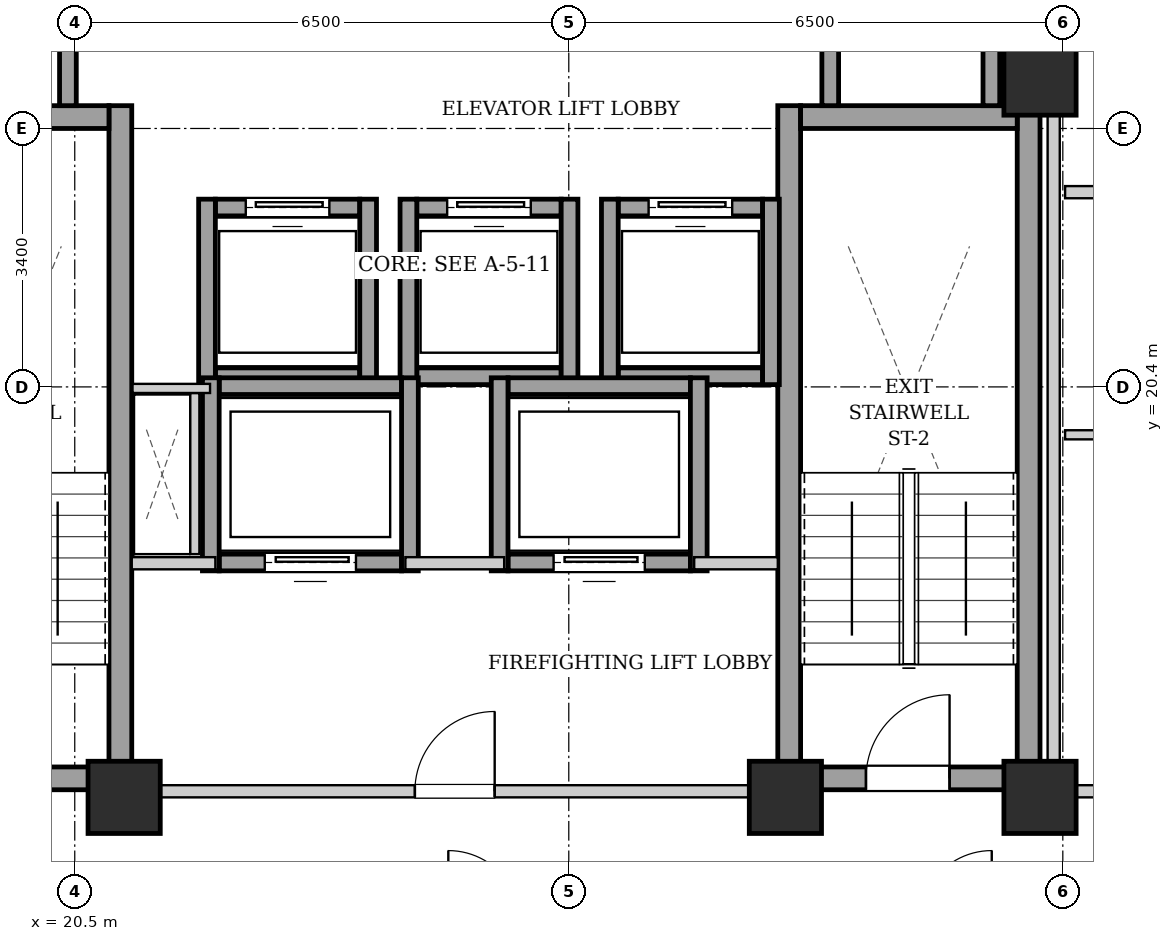
"""IFC4 building model, lengths in metres.
Left out: names, types, materials, properties, quantities, classifications, styles, units other than length and angle.
Written with IfcOpenShell. Run it as: python <this file> out.ifc"""

import sys

from ifc_helpers import new_model, si_unit, direction, frame, frame_2d, origin, origin_2d, place, context, subcontext, project, spatial, rectangle, extrude, element, fill, save


model = new_model("IFC4")
c1 = context("Model", 3, precision=1e-05, world=origin(), true_north=direction((0.0, 1.0)))
c2 = subcontext(c1, "Body", "Model", "MODEL_VIEW")
j1 = project(units=[si_unit("LENGTHUNIT", "METRE"), si_unit("PLANEANGLEUNIT", "RADIAN")], contexts=[c1])
p1 = place(None, origin())
s1 = spatial("IfcSite", under=j1, at=p1, CompositionType="ELEMENT")
p2 = place(p1, origin())
s2 = spatial("IfcBuilding", under=s1, at=p2, CompositionType="ELEMENT")
p3 = place(p2, frame((0.0, 0.0, 137.4)))
s3 = spatial("IfcBuildingStorey", under=s2, at=p3, CompositionType="ELEMENT", Elevation=137.4)
for number, where, z_axis, x_axis in (
    (1, (21.15, 15.0, 0.0), (0.0, 0.0, 1.0), (1.0, 0.0, 0.0)),
    (2, (29.85, 15.0, 0.0), (0.0, 0.0, 1.0), (1.0, 0.0, 0.0)),
    (3, (33.2, 15.0, 0.0), (0.0, 0.0, 1.0), (1.0, 0.0, 0.0)),
    (4, (33.2, 24.45, 0.0), (0.0, 0.0, 1.0), (1.0, 0.0, 0.0)),
):
    element("IfcColumn", number, at=place(p3, frame(where, z_axis=z_axis, x_axis=x_axis)), inside=s3, PredefinedType="COLUMN", context=c2, shape_type="SweptSolid", body=[
        extrude(rectangle(XDim=0.95, YDim=0.95, at=origin_2d()), origin(), (0.0, 0.0, 1.0), 3.25),
    ])
p4 = place(p3, frame((21.1, 15.1, 0.0), z_axis=(0.0, 0.0, 1.0), x_axis=(0.0, 1.0, 0.0)))
e5 = element("IfcWall", 5, at=p4, inside=s3, PredefinedType="SHEAR", context=c2, shape_type="SweptSolid", body=[
    extrude(rectangle(XDim=9.0, YDim=0.3, at=frame_2d((4.5, 0.0))), origin(), (0.0, 0.0, 1.0), 2.99),
])
p5 = place(p3, frame((18.1, 23.95, 0.0), z_axis=(0.0, 0.0, 1.0), x_axis=(1.0, 0.0, 0.0)))
e6 = element("IfcWall", 6, at=p5, inside=s3, PredefinedType="SHEAR", context=c2, shape_type="SweptSolid", body=[
    extrude(rectangle(XDim=2.85, YDim=0.3, at=frame_2d((1.425, 0.0))), origin(), (0.0, 0.0, 1.0), 2.99),
])
p6 = place(p3, frame((18.1, 15.25, 0.0), z_axis=(0.0, 0.0, 1.0), x_axis=(1.0, 0.0, 0.0)))
e7 = element("IfcWall", 7, at=p6, inside=s3, PredefinedType="SHEAR", context=c2, shape_type="SweptSolid", body=[
    extrude(rectangle(XDim=2.85, YDim=0.3, at=frame_2d((1.425, 0.0))), origin(), (0.0, 0.0, 1.0), 2.99),
])
p7 = place(p6, frame((0.86, 0.0, 0.0)))
e8 = element("IfcOpeningElement", 8, at=p7, cuts=e7, PredefinedType="OPENING", context=c2, shape_type="SweptSolid", body=[
    extrude(rectangle(XDim=1.1, YDim=2.05, at=frame_2d((0.55, 1.025))), frame((0.0, 0.16, 0.0), z_axis=(0.0, -1.0, 0.0), x_axis=(1.0, 0.0, 0.0)), (0.0, 0.0, 1.0), 0.32),
])
for number, where, z_axis, x_axis in (
    (9, (29.9, 15.1, 0.0), (0.0, 0.0, 1.0), (0.0, 1.0, 0.0)),
    (10, (33.05, 15.1, 0.0), (0.0, 0.0, 1.0), (0.0, 1.0, 0.0)),
):
    element("IfcWall", number, at=place(p3, frame(where, z_axis=z_axis, x_axis=x_axis)), inside=s3, PredefinedType="SHEAR", context=c2, shape_type="SweptSolid", body=[
        extrude(rectangle(XDim=9.0, YDim=0.3, at=frame_2d((4.5, 0.0))), origin(), (0.0, 0.0, 1.0), 2.99),
    ])
p8 = place(p3, frame((30.05, 23.95, 0.0), z_axis=(0.0, 0.0, 1.0), x_axis=(1.0, 0.0, 0.0)))
e11 = element("IfcWall", 11, at=p8, inside=s3, PredefinedType="SHEAR", context=c2, shape_type="SweptSolid", body=[
    extrude(rectangle(XDim=2.85, YDim=0.3, at=frame_2d((1.425, 0.0))), origin(), (0.0, 0.0, 1.0), 2.99),
])
p9 = place(p3, frame((30.05, 15.25, 0.0), z_axis=(0.0, 0.0, 1.0), x_axis=(1.0, 0.0, 0.0)))
e12 = element("IfcWall", 12, at=p9, inside=s3, PredefinedType="SHEAR", context=c2, shape_type="SweptSolid", body=[
    extrude(rectangle(XDim=2.85, YDim=0.3, at=frame_2d((1.425, 0.0))), origin(), (0.0, 0.0, 1.0), 2.99),
])
p10 = place(p9, frame((0.86, 0.0, 0.0)))
e13 = element("IfcOpeningElement", 13, at=p10, cuts=e12, PredefinedType="OPENING", context=c2, shape_type="SweptSolid", body=[
    extrude(rectangle(XDim=1.1, YDim=2.05, at=frame_2d((0.55, 1.025))), frame((0.0, 0.16, 0.0), z_axis=(0.0, -1.0, 0.0), x_axis=(1.0, 0.0, 0.0)), (0.0, 0.0, 1.0), 0.32),
])
p11 = place(p3, frame((22.35, 20.54, 0.0), z_axis=(0.0, 0.0, 1.0), x_axis=(1.0, 0.0, 0.0)))
e14 = element("IfcWall", 14, at=p11, inside=s3, PredefinedType="SHEAR", context=c2, shape_type="SweptSolid", body=[
    extrude(rectangle(XDim=1.9, YDim=0.22, at=frame_2d((0.95, 0.0))), origin(), (0.0, 0.0, 1.0), 2.99),
])
p12 = place(p3, frame((22.35, 22.76, 0.0), z_axis=(0.0, 0.0, 1.0), x_axis=(1.0, 0.0, 0.0)))
e15 = element("IfcWall", 15, at=p12, inside=s3, PredefinedType="SHEAR", context=c2, shape_type="SweptSolid", body=[
    extrude(rectangle(XDim=1.9, YDim=0.22, at=frame_2d((0.95, 0.0))), origin(), (0.0, 0.0, 1.0), 2.99),
])
p13 = place(p12, frame((0.4, 0.0, 0.0)))
e16 = element("IfcOpeningElement", 16, at=p13, cuts=e15, PredefinedType="OPENING", context=c2, shape_type="SweptSolid", body=[
    extrude(rectangle(XDim=1.1, YDim=2.15, at=frame_2d((0.55, 1.075))), frame((0.0, 0.12, 0.0), z_axis=(0.0, -1.0, 0.0), x_axis=(1.0, 0.0, 0.0)), (0.0, 0.0, 1.0), 0.24),
])
for number, where, z_axis, x_axis in (
    (17, (22.24, 20.43, 0.0), (0.0, 0.0, 1.0), (0.0, 1.0, 0.0)),
    (18, (24.36, 20.43, 0.0), (0.0, 0.0, 1.0), (0.0, 1.0, 0.0)),
):
    element("IfcWall", number, at=place(p3, frame(where, z_axis=z_axis, x_axis=x_axis)), inside=s3, PredefinedType="SHEAR", context=c2, shape_type="SweptSolid", body=[
        extrude(rectangle(XDim=2.44, YDim=0.22, at=frame_2d((1.22, 0.0))), origin(), (0.0, 0.0, 1.0), 2.99),
    ])
p14 = place(p3, frame((25.0, 20.54, 0.0), z_axis=(0.0, 0.0, 1.0), x_axis=(1.0, 0.0, 0.0)))
e19 = element("IfcWall", 19, at=p14, inside=s3, PredefinedType="SHEAR", context=c2, shape_type="SweptSolid", body=[
    extrude(rectangle(XDim=1.9, YDim=0.22, at=frame_2d((0.95, 0.0))), origin(), (0.0, 0.0, 1.0), 2.99),
])
p15 = place(p3, frame((25.0, 22.76, 0.0), z_axis=(0.0, 0.0, 1.0), x_axis=(1.0, 0.0, 0.0)))
e20 = element("IfcWall", 20, at=p15, inside=s3, PredefinedType="SHEAR", context=c2, shape_type="SweptSolid", body=[
    extrude(rectangle(XDim=1.9, YDim=0.22, at=frame_2d((0.95, 0.0))), origin(), (0.0, 0.0, 1.0), 2.99),
])
p16 = place(p15, frame((0.4, 0.0, 0.0)))
e21 = element("IfcOpeningElement", 21, at=p16, cuts=e20, PredefinedType="OPENING", context=c2, shape_type="SweptSolid", body=[
    extrude(rectangle(XDim=1.1, YDim=2.15, at=frame_2d((0.55, 1.075))), frame((0.0, 0.12, 0.0), z_axis=(0.0, -1.0, 0.0), x_axis=(1.0, 0.0, 0.0)), (0.0, 0.0, 1.0), 0.24),
])
for number, where, z_axis, x_axis in (
    (22, (24.89, 20.43, 0.0), (0.0, 0.0, 1.0), (0.0, 1.0, 0.0)),
    (23, (27.01, 20.43, 0.0), (0.0, 0.0, 1.0), (0.0, 1.0, 0.0)),
):
    element("IfcWall", number, at=place(p3, frame(where, z_axis=z_axis, x_axis=x_axis)), inside=s3, PredefinedType="SHEAR", context=c2, shape_type="SweptSolid", body=[
        extrude(rectangle(XDim=2.44, YDim=0.22, at=frame_2d((1.22, 0.0))), origin(), (0.0, 0.0, 1.0), 2.99),
    ])
p17 = place(p3, frame((27.65, 20.54, 0.0), z_axis=(0.0, 0.0, 1.0), x_axis=(1.0, 0.0, 0.0)))
e24 = element("IfcWall", 24, at=p17, inside=s3, PredefinedType="SHEAR", context=c2, shape_type="SweptSolid", body=[
    extrude(rectangle(XDim=1.9, YDim=0.22, at=frame_2d((0.95, 0.0))), origin(), (0.0, 0.0, 1.0), 2.99),
])
p18 = place(p3, frame((27.65, 22.76, 0.0), z_axis=(0.0, 0.0, 1.0), x_axis=(1.0, 0.0, 0.0)))
e25 = element("IfcWall", 25, at=p18, inside=s3, PredefinedType="SHEAR", context=c2, shape_type="SweptSolid", body=[
    extrude(rectangle(XDim=1.9, YDim=0.22, at=frame_2d((0.95, 0.0))), origin(), (0.0, 0.0, 1.0), 2.99),
])
p19 = place(p18, frame((0.4, 0.0, 0.0)))
e26 = element("IfcOpeningElement", 26, at=p19, cuts=e25, PredefinedType="OPENING", context=c2, shape_type="SweptSolid", body=[
    extrude(rectangle(XDim=1.1, YDim=2.15, at=frame_2d((0.55, 1.075))), frame((0.0, 0.12, 0.0), z_axis=(0.0, -1.0, 0.0), x_axis=(1.0, 0.0, 0.0)), (0.0, 0.0, 1.0), 0.24),
])
for number, where, z_axis, x_axis in (
    (27, (27.54, 20.43, 0.0), (0.0, 0.0, 1.0), (0.0, 1.0, 0.0)),
    (28, (29.66, 20.43, 0.0), (0.0, 0.0, 1.0), (0.0, 1.0, 0.0)),
):
    element("IfcWall", number, at=place(p3, frame(where, z_axis=z_axis, x_axis=x_axis)), inside=s3, PredefinedType="SHEAR", context=c2, shape_type="SweptSolid", body=[
        extrude(rectangle(XDim=2.44, YDim=0.22, at=frame_2d((1.22, 0.0))), origin(), (0.0, 0.0, 1.0), 2.99),
    ])
p20 = place(p3, frame((20.41, 24.1, 0.0), z_axis=(0.0, 0.0, 1.0), x_axis=(0.0, 1.0, 0.0)))
e29 = element("IfcWall", 29, at=p20, inside=s3, PredefinedType="SHEAR", context=c2, shape_type="SweptSolid", body=[
    extrude(rectangle(XDim=1.96, YDim=0.22, at=frame_2d((0.98, 0.0))), origin(), (0.0, 0.0, 1.0), 2.99),
])
for number, where, z_axis, x_axis in (
    (30, (30.44, 24.1, 0.0), (0.0, 0.0, 1.0), (0.0, 1.0, 0.0)),
    (31, (32.56, 24.1, 0.0), (0.0, 0.0, 1.0), (0.0, 1.0, 0.0)),
):
    element("IfcWall", number, at=place(p3, frame(where, z_axis=z_axis, x_axis=x_axis)), inside=s3, PredefinedType="SHEAR", context=c2, shape_type="SweptSolid", body=[
        extrude(rectangle(XDim=2.07, YDim=0.22, at=frame_2d((1.035, 0.0))), origin(), (0.0, 0.0, 1.0), 2.99),
    ])
p21 = place(p3, frame((22.4, 18.09, 0.0), z_axis=(0.0, 0.0, 1.0), x_axis=(1.0, 0.0, 0.0)))
e32 = element("IfcWall", 32, at=p21, inside=s3, PredefinedType="SHEAR", context=c2, shape_type="SweptSolid", body=[
    extrude(rectangle(XDim=2.4, YDim=0.22, at=frame_2d((1.2, 0.0))), origin(), (0.0, 0.0, 1.0), 2.99),
])
p22 = place(p21, frame((0.6, 0.0, 0.0)))
e33 = element("IfcOpeningElement", 33, at=p22, cuts=e32, PredefinedType="OPENING", context=c2, shape_type="SweptSolid", body=[
    extrude(rectangle(XDim=1.2, YDim=2.15, at=frame_2d((0.6, 1.075))), frame((0.0, 0.12, 0.0), z_axis=(0.0, -1.0, 0.0), x_axis=(1.0, 0.0, 0.0)), (0.0, 0.0, 1.0), 0.24),
])
p23 = place(p3, frame((22.4, 20.41, 0.0), z_axis=(0.0, 0.0, 1.0), x_axis=(1.0, 0.0, 0.0)))
e34 = element("IfcWall", 34, at=p23, inside=s3, PredefinedType="SHEAR", context=c2, shape_type="SweptSolid", body=[
    extrude(rectangle(XDim=2.4, YDim=0.22, at=frame_2d((1.2, 0.0))), origin(), (0.0, 0.0, 1.0), 2.99),
])
for number, where, z_axis, x_axis in (
    (35, (22.29, 17.98, 0.0), (0.0, 0.0, 1.0), (0.0, 1.0, 0.0)),
    (36, (24.91, 17.98, 0.0), (0.0, 0.0, 1.0), (0.0, 1.0, 0.0)),
):
    element("IfcWall", number, at=place(p3, frame(where, z_axis=z_axis, x_axis=x_axis)), inside=s3, PredefinedType="SHEAR", context=c2, shape_type="SweptSolid", body=[
        extrude(rectangle(XDim=2.54, YDim=0.22, at=frame_2d((1.27, 0.0))), origin(), (0.0, 0.0, 1.0), 2.99),
    ])
p24 = place(p3, frame((26.2, 18.09, 0.0), z_axis=(0.0, 0.0, 1.0), x_axis=(1.0, 0.0, 0.0)))
e37 = element("IfcWall", 37, at=p24, inside=s3, PredefinedType="SHEAR", context=c2, shape_type="SweptSolid", body=[
    extrude(rectangle(XDim=2.4, YDim=0.22, at=frame_2d((1.2, 0.0))), origin(), (0.0, 0.0, 1.0), 2.99),
])
p25 = place(p24, frame((0.6, 0.0, 0.0)))
e38 = element("IfcOpeningElement", 38, at=p25, cuts=e37, PredefinedType="OPENING", context=c2, shape_type="SweptSolid", body=[
    extrude(rectangle(XDim=1.2, YDim=2.15, at=frame_2d((0.6, 1.075))), frame((0.0, 0.12, 0.0), z_axis=(0.0, -1.0, 0.0), x_axis=(1.0, 0.0, 0.0)), (0.0, 0.0, 1.0), 0.24),
])
p26 = place(p3, frame((26.2, 20.41, 0.0), z_axis=(0.0, 0.0, 1.0), x_axis=(1.0, 0.0, 0.0)))
e39 = element("IfcWall", 39, at=p26, inside=s3, PredefinedType="SHEAR", context=c2, shape_type="SweptSolid", body=[
    extrude(rectangle(XDim=2.4, YDim=0.22, at=frame_2d((1.2, 0.0))), origin(), (0.0, 0.0, 1.0), 2.99),
])
for number, where, z_axis, x_axis in (
    (40, (26.09, 17.98, 0.0), (0.0, 0.0, 1.0), (0.0, 1.0, 0.0)),
    (41, (28.71, 17.98, 0.0), (0.0, 0.0, 1.0), (0.0, 1.0, 0.0)),
):
    element("IfcWall", number, at=place(p3, frame(where, z_axis=z_axis, x_axis=x_axis)), inside=s3, PredefinedType="SHEAR", context=c2, shape_type="SweptSolid", body=[
        extrude(rectangle(XDim=2.54, YDim=0.22, at=frame_2d((1.27, 0.0))), origin(), (0.0, 0.0, 1.0), 2.99),
    ])
p27 = place(p3, frame((21.25, 15.08, 0.0), z_axis=(0.0, 0.0, 1.0), x_axis=(1.0, 0.0, 0.0)))
e42 = element("IfcWall", 42, at=p27, inside=s3, PredefinedType="PARTITIONING", context=c2, shape_type="SweptSolid", body=[
    extrude(rectangle(XDim=8.5, YDim=0.16, at=frame_2d((4.25, 0.0))), origin(), (0.0, 0.0, 1.0), 2.426),
])
p28 = place(p27, frame((3.725, 0.0, 0.0)))
e43 = element("IfcOpeningElement", 43, at=p28, cuts=e42, PredefinedType="OPENING", context=c2, shape_type="SweptSolid", body=[
    extrude(rectangle(XDim=1.05, YDim=2.05, at=frame_2d((0.525, 1.025))), frame((0.0, 0.09, 0.0), z_axis=(0.0, -1.0, 0.0), x_axis=(1.0, 0.0, 0.0)), (0.0, 0.0, 1.0), 0.18),
])
p29 = place(p3, frame((21.25, 18.08, 0.0), z_axis=(0.0, 0.0, 1.0), x_axis=(1.0, 0.0, 0.0)))
e44 = element("IfcWall", 44, at=p29, inside=s3, PredefinedType="PARTITIONING", context=c2, shape_type="SweptSolid", body=[
    extrude(rectangle(XDim=1.1, YDim=0.16, at=frame_2d((0.55, 0.0))), origin(), (0.0, 0.0, 1.0), 2.99),
])
p30 = place(p3, frame((24.85, 18.08, 0.0), z_axis=(0.0, 0.0, 1.0), x_axis=(1.0, 0.0, 0.0)))
e45 = element("IfcWall", 45, at=p30, inside=s3, PredefinedType="PARTITIONING", context=c2, shape_type="SweptSolid", body=[
    extrude(rectangle(XDim=1.3, YDim=0.16, at=frame_2d((0.65, 0.0))), origin(), (0.0, 0.0, 1.0), 2.99),
])
p31 = place(p3, frame((28.65, 18.08, 0.0), z_axis=(0.0, 0.0, 1.0), x_axis=(1.0, 0.0, 0.0)))
e46 = element("IfcWall", 46, at=p31, inside=s3, PredefinedType="PARTITIONING", context=c2, shape_type="SweptSolid", body=[
    extrude(rectangle(XDim=1.1, YDim=0.16, at=frame_2d((0.55, 0.0))), origin(), (0.0, 0.0, 1.0), 2.99),
])
p32 = place(p3, frame((33.12, 24.12, 0.0), z_axis=(0.0, 0.0, 1.0), x_axis=(0.0, 1.0, 0.0)))
e47 = element("IfcWall", 47, at=p32, inside=s3, PredefinedType="PARTITIONING", context=c2, shape_type="SweptSolid", body=[
    extrude(rectangle(XDim=4.76, YDim=0.16, at=frame_2d((2.38, 0.0))), origin(), (0.0, 0.0, 1.0), 2.325),
])
p33 = place(p3, frame((22.08, 18.2, 0.0), z_axis=(0.0, 0.0, 1.0), x_axis=(0.0, 1.0, 0.0)))
e48 = element("IfcWall", 48, at=p33, inside=s3, PredefinedType="PARTITIONING", context=c2, shape_type="SweptSolid", body=[
    extrude(rectangle(XDim=2.12, YDim=0.12, at=frame_2d((1.06, 0.0))), origin(), (0.0, 0.0, 1.0), 2.99),
])
p34 = place(p3, frame((22.28, 20.38, 0.0), z_axis=(0.0, 0.0, 1.0), x_axis=(-1.0, 0.0, 0.0)))
e49 = element("IfcWall", 49, at=p34, inside=s3, PredefinedType="PARTITIONING", context=c2, shape_type="SweptSolid", body=[
    extrude(rectangle(XDim=1.02, YDim=0.12, at=frame_2d((0.51, 0.0))), origin(), (0.0, 0.0, 1.0), 2.99),
])
p35 = place(p3, frame((33.38, 15.08, 0.0), z_axis=(0.0, 0.0, 1.0), x_axis=(1.0, 0.0, 0.0)))
e50 = element("IfcWall", 50, at=p35, inside=s3, PredefinedType="PARTITIONING", context=c2, shape_type="SweptSolid", body=[
    extrude(rectangle(XDim=6.64, YDim=0.16, at=frame_2d((3.32, 0.0))), origin(), (0.0, 0.0, 1.0), 2.426),
])
p36 = place(p35, frame((0.9, 0.0, 0.0)))
e51 = element("IfcOpeningElement", 51, at=p36, cuts=e50, PredefinedType="OPENING", context=c2, shape_type="SweptSolid", body=[
    extrude(rectangle(XDim=0.95, YDim=2.1, at=frame_2d((0.475, 1.05))), frame((0.0, 0.09, 0.0), z_axis=(0.0, -1.0, 0.0), x_axis=(1.0, 0.0, 0.0)), (0.0, 0.0, 1.0), 0.18),
])
p37 = place(p3, frame((33.53, 22.962, 0.0), z_axis=(0.0, 0.0, 1.0), x_axis=(1.0, 0.0, 0.0)))
e52 = element("IfcWall", 52, at=p37, inside=s3, PredefinedType="PARTITIONING", context=c2, shape_type="SweptSolid", body=[
    extrude(rectangle(XDim=6.49, YDim=0.16, at=frame_2d((3.245, 0.0))), origin(), (0.0, 0.0, 1.0), 2.99),
])
p38 = place(p3, frame((33.53, 19.77, 0.0), z_axis=(0.0, 0.0, 1.0), x_axis=(1.0, 0.0, 0.0)))
e53 = element("IfcWall", 53, at=p38, inside=s3, PredefinedType="PARTITIONING", context=c2, shape_type="SweptSolid", body=[
    extrude(rectangle(XDim=2.45, YDim=0.12, at=frame_2d((1.225, 0.0))), origin(), (0.0, 0.0, 1.0), 2.99),
])
p39 = place(p38, frame((0.795, 0.0, 0.0)))
e54 = element("IfcOpeningElement", 54, at=p39, cuts=e53, PredefinedType="OPENING", context=c2, shape_type="SweptSolid", body=[
    extrude(rectangle(XDim=0.86, YDim=2.05, at=frame_2d((0.43, 1.025))), frame((0.0, 0.07, 0.0), z_axis=(0.0, -1.0, 0.0), x_axis=(1.0, 0.0, 0.0)), (0.0, 0.0, 1.0), 0.14),
])
p40 = place(p3, frame((33.38, 15.02, 0.0), z_axis=(0.0, 0.0, 1.0), x_axis=(0.0, 1.0, 0.0)))
e55 = element("IfcWall", 55, at=p40, inside=s3, PredefinedType="PARTITIONING", context=c2, shape_type="SweptSolid", body=[
    extrude(rectangle(XDim=13.98, YDim=0.16, at=frame_2d((6.99, 0.0))), origin(), (0.0, 0.0, 1.0), 2.325),
])
p41 = place(p10, origin())
e56 = element("IfcDoor", 56, at=p41, inside=s3, OperationType="SINGLE_SWING_RIGHT", PredefinedType="DOOR", context=c2, shape_type="SweptSolid", body=[
    extrude(rectangle(XDim=1.1, YDim=2.05, at=frame_2d((0.55, 1.025))), frame((0.0, 0.025, 0.0), z_axis=(0.0, -1.0, 0.0), x_axis=(1.0, 0.0, 0.0)), (0.0, 0.0, 1.0), 0.05),
])
fill(e13, e56)
p42 = place(p13, origin())
e57 = element("IfcDoor", 57, at=p42, inside=s3, OperationType="SLIDING_TO_LEFT", PredefinedType="DOOR", context=c2, shape_type="SweptSolid", body=[
    extrude(rectangle(XDim=1.1, YDim=2.15, at=frame_2d((0.55, 1.075))), frame((0.0, 0.025, 0.0), z_axis=(0.0, -1.0, 0.0), x_axis=(1.0, 0.0, 0.0)), (0.0, 0.0, 1.0), 0.05),
])
fill(e16, e57)
p43 = place(p16, origin())
e58 = element("IfcDoor", 58, at=p43, inside=s3, OperationType="SLIDING_TO_LEFT", PredefinedType="DOOR", context=c2, shape_type="SweptSolid", body=[
    extrude(rectangle(XDim=1.1, YDim=2.15, at=frame_2d((0.55, 1.075))), frame((0.0, 0.025, 0.0), z_axis=(0.0, -1.0, 0.0), x_axis=(1.0, 0.0, 0.0)), (0.0, 0.0, 1.0), 0.05),
])
fill(e21, e58)
p44 = place(p19, origin())
e59 = element("IfcDoor", 59, at=p44, inside=s3, OperationType="SLIDING_TO_LEFT", PredefinedType="DOOR", context=c2, shape_type="SweptSolid", body=[
    extrude(rectangle(XDim=1.1, YDim=2.15, at=frame_2d((0.55, 1.075))), frame((0.0, 0.025, 0.0), z_axis=(0.0, -1.0, 0.0), x_axis=(1.0, 0.0, 0.0)), (0.0, 0.0, 1.0), 0.05),
])
fill(e26, e59)
p45 = place(p22, origin())
e60 = element("IfcDoor", 60, at=p45, inside=s3, OperationType="SLIDING_TO_LEFT", PredefinedType="DOOR", context=c2, shape_type="SweptSolid", body=[
    extrude(rectangle(XDim=1.2, YDim=2.15, at=frame_2d((0.6, 1.075))), frame((0.0, 0.025, 0.0), z_axis=(0.0, -1.0, 0.0), x_axis=(1.0, 0.0, 0.0)), (0.0, 0.0, 1.0), 0.05),
])
fill(e33, e60)
p46 = place(p25, origin())
e61 = element("IfcDoor", 61, at=p46, inside=s3, OperationType="SLIDING_TO_LEFT", PredefinedType="DOOR", context=c2, shape_type="SweptSolid", body=[
    extrude(rectangle(XDim=1.2, YDim=2.15, at=frame_2d((0.6, 1.075))), frame((0.0, 0.025, 0.0), z_axis=(0.0, -1.0, 0.0), x_axis=(1.0, 0.0, 0.0)), (0.0, 0.0, 1.0), 0.05),
])
fill(e38, e61)
p47 = place(p28, origin())
e62 = element("IfcDoor", 62, at=p47, inside=s3, OperationType="SINGLE_SWING_RIGHT", PredefinedType="DOOR", context=c2, shape_type="SweptSolid", body=[
    extrude(rectangle(XDim=1.05, YDim=2.05, at=frame_2d((0.525, 1.025))), frame((0.0, 0.025, 0.0), z_axis=(0.0, -1.0, 0.0), x_axis=(1.0, 0.0, 0.0)), (0.0, 0.0, 1.0), 0.05),
])
fill(e43, e62)
save(model, sys.argv[1])
